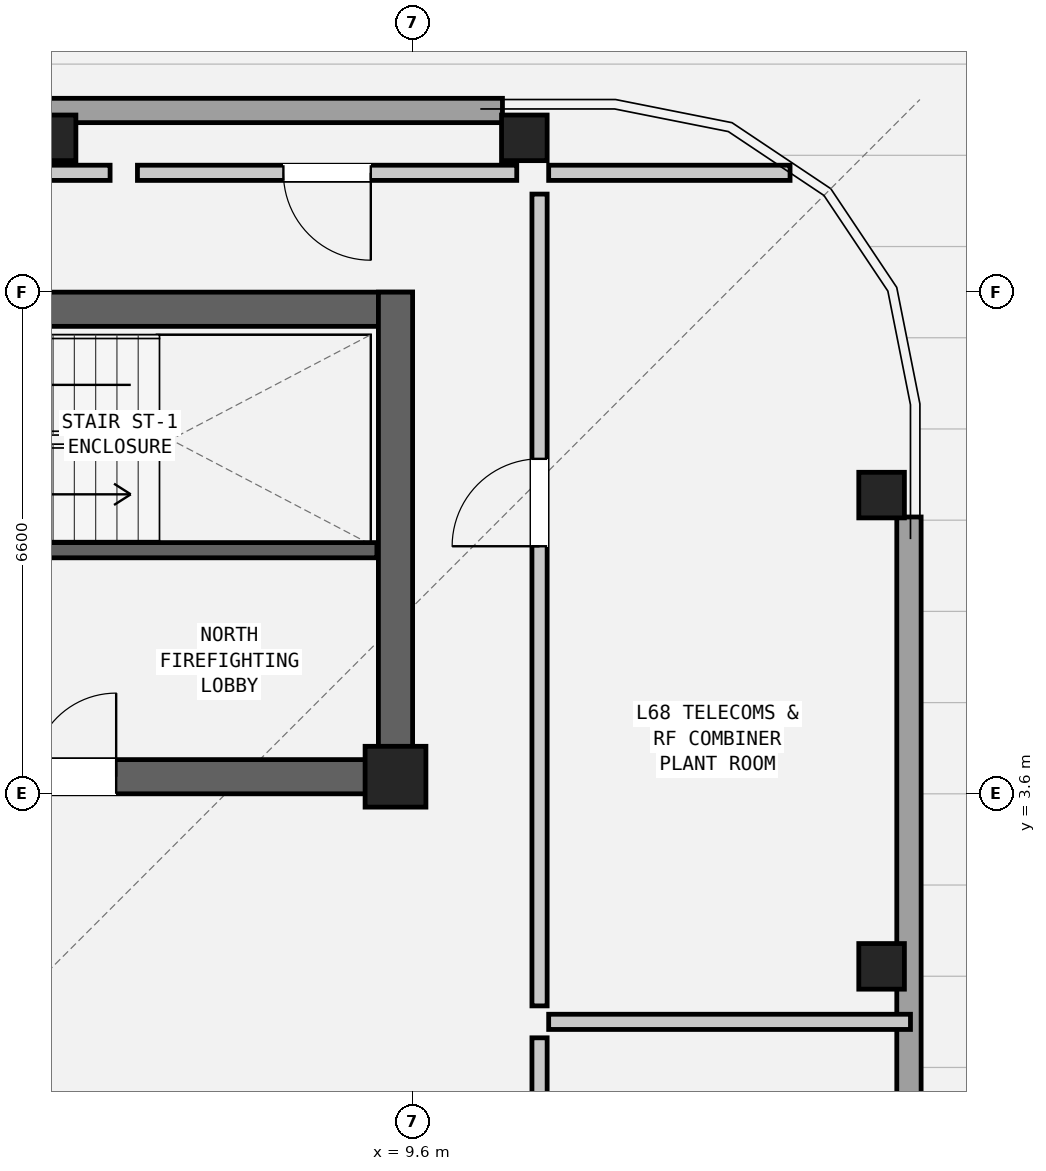
"""IFC4 building model, lengths in metres.
Left out: names, types, materials, properties, quantities, classifications, styles, units other than length and angle.
Written with IfcOpenShell. Run it as: python <this file> out.ifc"""

import sys

from ifc_helpers import new_model, si_unit, direction, frame, frame_2d, origin, origin_2d, place, context, subcontext, project, spatial, rectangle, hollow_rectangle, extrude, element, fill, save


model = new_model("IFC4")
c1 = context("Model", 3, precision=1e-05, world=origin(), true_north=direction((0.0, 1.0)))
c2 = subcontext(c1, "Body", "Model", "MODEL_VIEW")
j1 = project(units=[si_unit("LENGTHUNIT", "METRE"), si_unit("PLANEANGLEUNIT", "RADIAN")], contexts=[c1])
p1 = place(None, origin())
s1 = spatial("IfcSite", under=j1, at=p1, CompositionType="ELEMENT")
p2 = place(p1, origin())
s2 = spatial("IfcBuilding", under=s1, at=p2, CompositionType="ELEMENT")
p3 = place(p2, frame((0.0, 0.0, 231.3)))
s3 = spatial("IfcBuildingStorey", under=s2, at=p3, CompositionType="ELEMENT", Elevation=231.3)
p4 = place(p3, frame((-9.6, 9.975, 0.0), z_axis=(0.0, 0.0, 1.0), x_axis=(1.0, 0.0, 0.0)))
e1 = element("IfcWall", 1, at=p4, inside=s3, PredefinedType="SHEAR", context=c2, shape_type="SweptSolid", body=[
    extrude(rectangle(XDim=19.2, YDim=0.45, at=frame_2d((9.6, 0.0))), origin(), (0.0, 0.0, 1.0), 3.6),
])
p5 = place(p3, frame((-9.6, 3.825, 0.0), z_axis=(0.0, 0.0, 1.0), x_axis=(1.0, 0.0, 0.0)))
e2 = element("IfcWall", 2, at=p5, inside=s3, PredefinedType="SHEAR", context=c2, shape_type="SweptSolid", body=[
    extrude(rectangle(XDim=19.2, YDim=0.45, at=frame_2d((9.6, 0.0))), origin(), (0.0, 0.0, 1.0), 3.6),
])
p6 = place(p5, frame((14.2, 0.0, 0.0)))
e3 = element("IfcOpeningElement", 3, at=p6, cuts=e2, PredefinedType="OPENING", context=c2, shape_type="SweptSolid", body=[
    extrude(rectangle(XDim=1.1, YDim=2.08, at=frame_2d((0.55, 1.04))), frame((0.0, 0.237, 0.0), z_axis=(0.0, -1.0, 0.0), x_axis=(1.0, 0.0, 0.0)), (0.0, 0.0, 1.0), 0.474),
])
p7 = place(p5, frame((8.2, 0.0, 0.0)))
e4 = element("IfcOpeningElement", 4, at=p7, cuts=e2, PredefinedType="OPENING", context=c2, shape_type="SweptSolid", body=[
    extrude(rectangle(XDim=1.15, YDim=2.1, at=frame_2d((0.575, 1.05))), frame((0.0, 0.237, 0.0), z_axis=(0.0, -1.0, 0.0), x_axis=(1.0, 0.0, 0.0)), (0.0, 0.0, 1.0), 0.474),
])
p8 = place(p5, frame((2.5, 0.0, 0.0)))
e5 = element("IfcOpeningElement", 5, at=p8, cuts=e2, PredefinedType="OPENING", context=c2, shape_type="SweptSolid", body=[
    extrude(rectangle(XDim=1.6, YDim=2.12, at=frame_2d((0.8, 1.06))), frame((0.0, 0.237, 0.0), z_axis=(0.0, -1.0, 0.0), x_axis=(1.0, 0.0, 0.0)), (0.0, 0.0, 1.0), 0.474),
])
p9 = place(p3, frame((9.375, 3.6, 0.0), z_axis=(0.0, 0.0, 1.0), x_axis=(0.0, 1.0, 0.0)))
e6 = element("IfcWall", 6, at=p9, inside=s3, PredefinedType="SHEAR", context=c2, shape_type="SweptSolid", body=[
    extrude(rectangle(XDim=6.6, YDim=0.45, at=frame_2d((3.3, 0.0))), origin(), (0.0, 0.0, 1.0), 3.6),
])
for number, where, z_axis, x_axis in (
    (7, (15.77, 1.33, 0.0), (0.0, 0.0, 1.0), (0.0, 1.0, 0.0)),
    (8, (15.77, 7.53, 0.0), (0.0, 0.0, 1.0), (0.0, 1.0, 0.0)),
    (9, (11.07, 12.23, 0.0), (0.0, 0.0, 1.0), (1.0, 0.0, 0.0)),
    (10, (4.87, 12.23, 0.0), (0.0, 0.0, 1.0), (1.0, 0.0, 0.0)),
):
    element("IfcColumn", number, at=place(p3, frame(where, z_axis=z_axis, x_axis=x_axis)), inside=s3, PredefinedType="COLUMN", context=c2, shape_type="SweptSolid", body=[
        extrude(hollow_rectangle(XDim=0.6, YDim=0.6, WallThickness=0.04, at=origin_2d()), origin(), (0.0, 0.0, 1.0), 3.6),
    ])
p10 = place(p3, frame((9.375, 3.825, 0.0), z_axis=(0.0, 0.0, 1.0), x_axis=(1.0, 0.0, 0.0)))
e11 = element("IfcColumn", 11, at=p10, inside=s3, PredefinedType="COLUMN", context=c2, shape_type="SweptSolid", body=[
    extrude(rectangle(XDim=0.8, YDim=0.8, at=origin_2d()), origin(), (0.0, 0.0, 1.0), 3.6),
])
for number, where, z_axis, x_axis in (
    (12, (16.13, 7.242, 0.0), (0.0, 0.0, 1.0), (0.0, -1.0, 0.0)),
    (13, (-7.242, 12.59, 0.0), (0.0, 0.0, 1.0), (1.0, 0.0, 0.0)),
):
    element("IfcWall", number, at=place(p3, frame(where, z_axis=z_axis, x_axis=x_axis)), inside=s3, PredefinedType="SOLIDWALL", context=c2, shape_type="SweptSolid", body=[
        extrude(rectangle(XDim=18.024, YDim=0.32, at=frame_2d((9.012, 0.0))), origin(), (0.0, 0.0, 1.0), 2.182),
    ])
p11 = place(p3, frame((2.36, 6.805, 0.0), z_axis=(0.0, 0.0, 1.0), x_axis=(1.0, 0.0, 0.0)))
e14 = element("IfcWall", 14, at=p11, inside=s3, PredefinedType="SHEAR", context=c2, shape_type="SweptSolid", body=[
    extrude(rectangle(XDim=6.77, YDim=0.2, at=frame_2d((3.385, 0.0))), origin(), (0.0, 0.0, 1.0), 3.32),
])
p12 = place(p11, frame((0.3, 0.0, 0.0)))
e15 = element("IfcOpeningElement", 15, at=p12, cuts=e14, PredefinedType="OPENING", context=c2, shape_type="SweptSolid", body=[
    extrude(rectangle(XDim=1.05, YDim=2.08, at=frame_2d((0.525, 1.04))), frame((0.0, 0.112, 0.0), z_axis=(0.0, -1.0, 0.0), x_axis=(1.0, 0.0, 0.0)), (0.0, 0.0, 1.0), 0.224),
])
p13 = place(p3, frame((5.62, 11.77, 0.0), z_axis=(0.0, 0.0, 1.0), x_axis=(-1.0, 0.0, 0.0)))
e16 = element("IfcWall", 16, at=p13, inside=s3, PredefinedType="PARTITIONING", context=c2, shape_type="SweptSolid", body=[
    extrude(rectangle(XDim=5.09, YDim=0.2, at=frame_2d((2.545, 0.0))), origin(), (0.0, 0.0, 1.0), 2.182),
])
p14 = place(p13, frame((1.97, 0.0, 0.0)))
e17 = element("IfcOpeningElement", 17, at=p14, cuts=e16, PredefinedType="OPENING", context=c2, shape_type="SweptSolid", body=[
    extrude(rectangle(XDim=1.15, YDim=2.1, at=frame_2d((0.575, 1.05))), frame((0.0, 0.112, 0.0), z_axis=(0.0, -1.0, 0.0), x_axis=(1.0, 0.0, 0.0)), (0.0, 0.0, 1.0), 0.224),
])
p15 = place(p3, frame((10.97, 11.77, 0.0), z_axis=(0.0, 0.0, 1.0), x_axis=(-1.0, 0.0, 0.0)))
e18 = element("IfcWall", 18, at=p15, inside=s3, PredefinedType="PARTITIONING", context=c2, shape_type="SweptSolid", body=[
    extrude(rectangle(XDim=4.99, YDim=0.2, at=frame_2d((2.495, 0.0))), origin(), (0.0, 0.0, 1.0), 2.182),
])
p16 = place(p15, frame((1.92, 0.0, 0.0)))
e19 = element("IfcOpeningElement", 19, at=p16, cuts=e18, PredefinedType="OPENING", context=c2, shape_type="SweptSolid", body=[
    extrude(rectangle(XDim=1.15, YDim=2.1, at=frame_2d((0.575, 1.05))), frame((0.0, 0.112, 0.0), z_axis=(0.0, -1.0, 0.0), x_axis=(1.0, 0.0, 0.0)), (0.0, 0.0, 1.0), 0.224),
])
p17 = place(p3, frame((11.39, 11.77, 0.0), z_axis=(0.0, 0.0, 1.0), x_axis=(1.0, 0.0, 0.0)))
e20 = element("IfcWall", 20, at=p17, inside=s3, PredefinedType="PARTITIONING", context=c2, shape_type="SweptSolid", body=[
    extrude(rectangle(XDim=3.176, YDim=0.2, at=frame_2d((1.588, 0.0))), origin(), (0.0, 0.0, 1.0), 3.32),
])
p18 = place(p3, frame((11.39, 0.6, 0.0), z_axis=(0.0, 0.0, 1.0), x_axis=(1.0, 0.0, 0.0)))
e21 = element("IfcWall", 21, at=p18, inside=s3, PredefinedType="PARTITIONING", context=c2, shape_type="SweptSolid", body=[
    extrude(rectangle(XDim=4.76, YDim=0.2, at=frame_2d((2.38, 0.0))), origin(), (0.0, 0.0, 1.0), 2.538),
])
p19 = place(p3, frame((11.27, -10.29, 0.0), z_axis=(0.0, 0.0, 1.0), x_axis=(0.0, 1.0, 0.0)))
e22 = element("IfcWall", 22, at=p19, inside=s3, PredefinedType="PARTITIONING", context=c2, shape_type="SweptSolid", body=[
    extrude(rectangle(XDim=10.68, YDim=0.2, at=frame_2d((5.34, 0.0))), origin(), (0.0, 0.0, 1.0), 3.32),
])
p20 = place(p19, frame((4.765, 0.0, 0.0)))
e23 = element("IfcOpeningElement", 23, at=p20, cuts=e22, PredefinedType="OPENING", context=c2, shape_type="SweptSolid", body=[
    extrude(rectangle(XDim=1.15, YDim=2.1, at=frame_2d((0.575, 1.05))), frame((0.0, 0.112, 0.0), z_axis=(0.0, -1.0, 0.0), x_axis=(1.0, 0.0, 0.0)), (0.0, 0.0, 1.0), 0.224),
])
p21 = place(p3, frame((11.27, 0.81, 0.0), z_axis=(0.0, 0.0, 1.0), x_axis=(0.0, 1.0, 0.0)))
e24 = element("IfcWall", 24, at=p21, inside=s3, PredefinedType="PARTITIONING", context=c2, shape_type="SweptSolid", body=[
    extrude(rectangle(XDim=10.68, YDim=0.2, at=frame_2d((5.34, 0.0))), origin(), (0.0, 0.0, 1.0), 3.32),
])
p22 = place(p21, frame((6.047, 0.0, 0.0)))
e25 = element("IfcOpeningElement", 25, at=p22, cuts=e24, PredefinedType="OPENING", context=c2, shape_type="SweptSolid", body=[
    extrude(rectangle(XDim=1.15, YDim=2.1, at=frame_2d((0.575, 1.05))), frame((0.0, 0.112, 0.0), z_axis=(0.0, -1.0, 0.0), x_axis=(1.0, 0.0, 0.0)), (0.0, 0.0, 1.0), 0.224),
])
p23 = place(p6, origin())
e26 = element("IfcDoor", 26, at=p23, inside=s3, OperationType="SINGLE_SWING_RIGHT", PredefinedType="DOOR", context=c2, shape_type="SweptSolid", body=[
    extrude(rectangle(XDim=1.1, YDim=2.08, at=frame_2d((0.55, 1.04))), frame((0.0, 0.025, 0.0), z_axis=(0.0, -1.0, 0.0), x_axis=(1.0, 0.0, 0.0)), (0.0, 0.0, 1.0), 0.05),
])
fill(e3, e26)
p24 = place(p16, origin())
e27 = element("IfcDoor", 27, at=p24, inside=s3, OperationType="SINGLE_SWING_LEFT", PredefinedType="DOOR", context=c2, shape_type="SweptSolid", body=[
    extrude(rectangle(XDim=1.15, YDim=2.1, at=frame_2d((0.575, 1.05))), frame((0.0, 0.025, 0.0), z_axis=(0.0, -1.0, 0.0), x_axis=(1.0, 0.0, 0.0)), (0.0, 0.0, 1.0), 0.05),
])
fill(e19, e27)
p25 = place(p22, origin())
e28 = element("IfcDoor", 28, at=p25, inside=s3, OperationType="SINGLE_SWING_LEFT", PredefinedType="DOOR", context=c2, shape_type="SweptSolid", body=[
    extrude(rectangle(XDim=1.15, YDim=2.1, at=frame_2d((0.575, 1.05))), frame((0.0, 0.025, 0.0), z_axis=(0.0, -1.0, 0.0), x_axis=(1.0, 0.0, 0.0)), (0.0, 0.0, 1.0), 0.05),
])
fill(e25, e28)
save(model, sys.argv[1])
